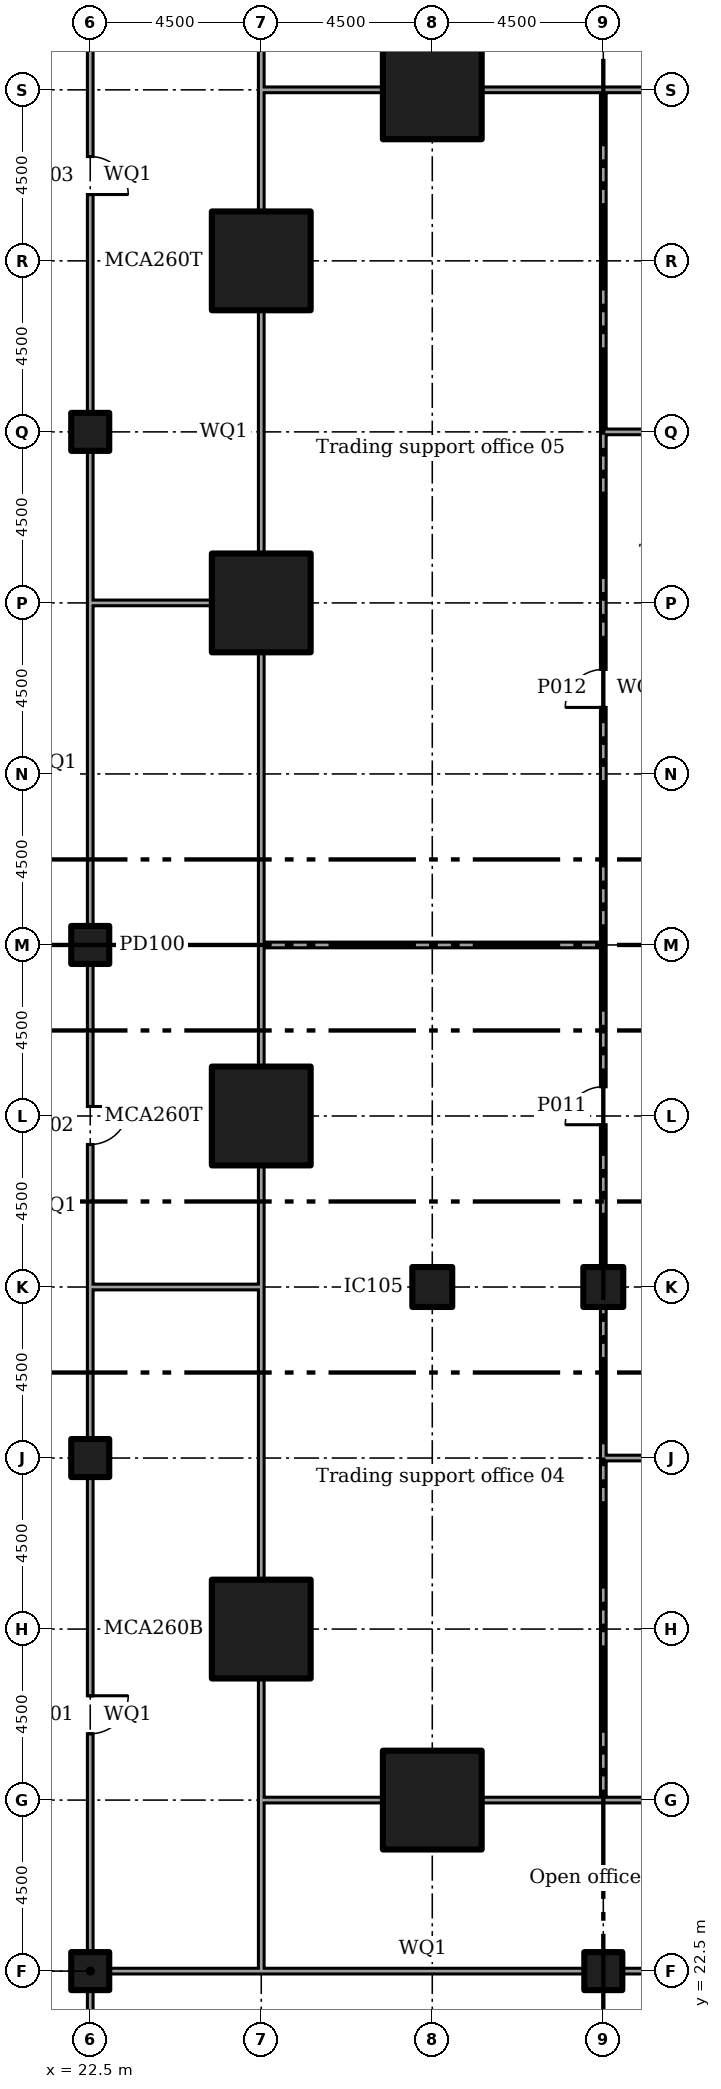
"""IFC4 building model, lengths in metres.
Left out: names, types, materials, properties, quantities, classifications, styles, units other than length and angle.
Written with IfcOpenShell. Run it as: python <this file> out.ifc"""

import sys

from ifc_helpers import new_model, si_unit, direction, frame, frame_2d, origin, origin_2d, place, context, subcontext, project, spatial, rectangle, extrude, element, fill, save


model = new_model("IFC4")
c1 = context("Model", 3, precision=1e-05, world=origin(), true_north=direction((0.0, 1.0)))
c2 = subcontext(c1, "Body", "Model", "MODEL_VIEW")
j1 = project(units=[si_unit("LENGTHUNIT", "METRE"), si_unit("PLANEANGLEUNIT", "RADIAN")], contexts=[c1])
p1 = place(None, origin())
s1 = spatial("IfcSite", under=j1, at=p1, CompositionType="ELEMENT")
p2 = place(p1, origin())
s2 = spatial("IfcBuilding", under=s1, at=p2, CompositionType="ELEMENT")
p3 = place(p2, frame((0.0, 0.0, 11.5)))
s3 = spatial("IfcBuildingStorey", under=s2, at=p3, CompositionType="ELEMENT", Elevation=11.5)
for number, where in (
    (1, (27.0, 31.5, 0.0)),
    (2, (27.0, 45.0, 0.0)),
    (3, (27.0, 58.5, 0.0)),
    (4, (27.0, 67.5, 0.0)),
    (5, (31.5, 27.0, 0.0)),
    (6, (31.5, 72.0, 0.0)),
):
    element("IfcColumn", number, at=place(p3, frame(where)), inside=s3, PredefinedType="COLUMN", context=c2, shape_type="SweptSolid", body=[
        extrude(rectangle(XDim=2.6, YDim=2.6, at=origin_2d()), origin(), (0.0, 0.0, 1.0), 5.0),
    ])
for number, where in (
    (7, (31.5, 40.5, 0.0)),
    (8, (36.0, 40.5, 0.0)),
):
    element("IfcColumn", number, at=place(p3, frame(where)), inside=s3, PredefinedType="COLUMN", context=c2, shape_type="SweptSolid", body=[
        extrude(rectangle(XDim=1.05, YDim=1.05, at=origin_2d()), origin(), (0.0, 0.0, 1.0), 5.0),
    ])
for number, where in (
    (9, (22.5, 22.5, 0.0)),
    (10, (22.5, 36.0, 0.0)),
    (11, (22.5, 49.5, 0.0)),
    (12, (22.5, 63.0, 0.0)),
    (13, (36.0, 22.5, 0.0)),
):
    element("IfcColumn", number, at=place(p3, frame(where)), inside=s3, PredefinedType="COLUMN", context=c2, shape_type="SweptSolid", body=[
        extrude(rectangle(XDim=1.0, YDim=1.0, at=origin_2d()), origin(), (0.0, 0.0, 1.0), 5.0),
    ])
p4 = place(p3, frame((22.5, 18.3, 0.0), z_axis=(0.0, 0.0, 1.0), x_axis=(0.0, 1.0, 0.0)))
e14 = element("IfcWall", 14, at=p4, inside=s3, PredefinedType="PARTITIONING", context=c2, shape_type="SweptSolid", body=[
    extrude(rectangle(XDim=3.705, YDim=0.15, at=frame_2d((1.853, 0.0))), origin(), (0.0, 0.0, 1.0), 4.55),
])
p5 = place(p4, frame((1.25, 0.0, 0.0)))
e15 = element("IfcOpeningElement", 15, at=p5, cuts=e14, PredefinedType="OPENING", context=c2, shape_type="SweptSolid", body=[
    extrude(rectangle(XDim=1.2, YDim=2.1, at=frame_2d((0.6, 1.05))), frame((0.0, 0.085, 0.0), z_axis=(0.0, -1.0, 0.0), x_axis=(1.0, 0.0, 0.0)), (0.0, 0.0, 1.0), 0.17),
])
p6 = place(p3, frame((22.5, 22.995, 0.0), z_axis=(0.0, 0.0, 1.0), x_axis=(0.0, 1.0, 0.0)))
e16 = element("IfcWall", 16, at=p6, inside=s3, PredefinedType="PARTITIONING", context=c2, shape_type="SweptSolid", body=[
    extrude(rectangle(XDim=12.51, YDim=0.15, at=frame_2d((6.255, 0.0))), origin(), (0.0, 0.0, 1.0), 4.55),
])
p7 = place(p6, frame((5.75, 0.0, 0.0)))
e17 = element("IfcOpeningElement", 17, at=p7, cuts=e16, PredefinedType="OPENING", context=c2, shape_type="SweptSolid", body=[
    extrude(rectangle(XDim=1.0, YDim=2.1, at=frame_2d((0.5, 1.05))), frame((0.0, 0.085, 0.0), z_axis=(0.0, -1.0, 0.0), x_axis=(1.0, 0.0, 0.0)), (0.0, 0.0, 1.0), 0.17),
])
p8 = place(p3, frame((22.5, 36.495, 0.0), z_axis=(0.0, 0.0, 1.0), x_axis=(0.0, 1.0, 0.0)))
e18 = element("IfcWall", 18, at=p8, inside=s3, PredefinedType="PARTITIONING", context=c2, shape_type="SweptSolid", body=[
    extrude(rectangle(XDim=4.08, YDim=0.15, at=frame_2d((2.04, 0.0))), origin(), (0.0, 0.0, 1.0), 4.55),
])
p9 = place(p3, frame((22.5, 40.5, 0.0), z_axis=(0.0, 0.0, 1.0), x_axis=(0.0, 1.0, 0.0)))
e19 = element("IfcWall", 19, at=p9, inside=s3, PredefinedType="PARTITIONING", context=c2, shape_type="SweptSolid", body=[
    extrude(rectangle(XDim=8.505, YDim=0.15, at=frame_2d((4.252, 0.0))), origin(), (0.0, 0.0, 1.0), 4.55),
])
p10 = place(p9, frame((3.75, 0.0, 0.0)))
e20 = element("IfcOpeningElement", 20, at=p10, cuts=e19, PredefinedType="OPENING", context=c2, shape_type="SweptSolid", body=[
    extrude(rectangle(XDim=1.0, YDim=2.1, at=frame_2d((0.5, 1.05))), frame((0.0, 0.085, 0.0), z_axis=(0.0, -1.0, 0.0), x_axis=(1.0, 0.0, 0.0)), (0.0, 0.0, 1.0), 0.17),
])
p11 = place(p3, frame((22.5, 49.995, 0.0), z_axis=(0.0, 0.0, 1.0), x_axis=(0.0, 1.0, 0.0)))
e21 = element("IfcWall", 21, at=p11, inside=s3, PredefinedType="PARTITIONING", context=c2, shape_type="SweptSolid", body=[
    extrude(rectangle(XDim=8.58, YDim=0.15, at=frame_2d((4.29, 0.0))), origin(), (0.0, 0.0, 1.0), 4.55),
])
p12 = place(p3, frame((22.5, 58.5, 0.0), z_axis=(0.0, 0.0, 1.0), x_axis=(0.0, 1.0, 0.0)))
e22 = element("IfcWall", 22, at=p12, inside=s3, PredefinedType="PARTITIONING", context=c2, shape_type="SweptSolid", body=[
    extrude(rectangle(XDim=4.005, YDim=0.15, at=frame_2d((2.002, 0.0))), origin(), (0.0, 0.0, 1.0), 4.55),
])
p13 = place(p3, frame((22.5, 63.495, 0.0), z_axis=(0.0, 0.0, 1.0), x_axis=(0.0, 1.0, 0.0)))
e23 = element("IfcWall", 23, at=p13, inside=s3, PredefinedType="PARTITIONING", context=c2, shape_type="SweptSolid", body=[
    extrude(rectangle(XDim=12.51, YDim=0.15, at=frame_2d((6.255, 0.0))), origin(), (0.0, 0.0, 1.0), 4.55),
])
p14 = place(p13, frame((5.75, 0.0, 0.0)))
e24 = element("IfcOpeningElement", 24, at=p14, cuts=e23, PredefinedType="OPENING", context=c2, shape_type="SweptSolid", body=[
    extrude(rectangle(XDim=1.0, YDim=2.1, at=frame_2d((0.5, 1.05))), frame((0.0, 0.085, 0.0), z_axis=(0.0, -1.0, 0.0), x_axis=(1.0, 0.0, 0.0)), (0.0, 0.0, 1.0), 0.17),
])
p15 = place(p3, frame((22.995, 22.5, 0.0)))
e25 = element("IfcWall", 25, at=p15, inside=s3, PredefinedType="PARTITIONING", context=c2, shape_type="SweptSolid", body=[
    extrude(rectangle(XDim=4.08, YDim=0.15, at=frame_2d((2.04, 0.0))), origin(), (0.0, 0.0, 1.0), 4.55),
])
p16 = place(p3, frame((27.0, 22.5, 0.0)))
e26 = element("IfcWall", 26, at=p16, inside=s3, PredefinedType="PARTITIONING", context=c2, shape_type="SweptSolid", body=[
    extrude(rectangle(XDim=8.505, YDim=0.15, at=frame_2d((4.252, 0.0))), origin(), (0.0, 0.0, 1.0), 4.55),
])
p17 = place(p3, frame((36.495, 22.5, 0.0)))
e27 = element("IfcWall", 27, at=p17, inside=s3, PredefinedType="PARTITIONING", context=c2, shape_type="SweptSolid", body=[
    extrude(rectangle(XDim=12.51, YDim=0.15, at=frame_2d((6.255, 0.0))), origin(), (0.0, 0.0, 1.0), 4.55),
])
p18 = place(p17, frame((5.75, 0.0, 0.0)))
e28 = element("IfcOpeningElement", 28, at=p18, cuts=e27, PredefinedType="OPENING", context=c2, shape_type="SweptSolid", body=[
    extrude(rectangle(XDim=1.0, YDim=2.1, at=frame_2d((0.5, 1.05))), frame((0.0, 0.085, 0.0), z_axis=(0.0, -1.0, 0.0), x_axis=(1.0, 0.0, 0.0)), (0.0, 0.0, 1.0), 0.17),
])
p19 = place(p3, frame((22.575, 40.5, 0.0)))
e29 = element("IfcWall", 29, at=p19, inside=s3, PredefinedType="PARTITIONING", context=c2, shape_type="SweptSolid", body=[
    extrude(rectangle(XDim=4.5, YDim=0.15, at=frame_2d((2.25, 0.0))), origin(), (0.0, 0.0, 1.0), 4.55),
])
p20 = place(p3, frame((27.0, 22.575, 0.0), z_axis=(0.0, 0.0, 1.0), x_axis=(0.0, 1.0, 0.0)))
e30 = element("IfcWall", 30, at=p20, inside=s3, PredefinedType="PARTITIONING", context=c2, shape_type="SweptSolid", body=[
    extrude(rectangle(XDim=4.5, YDim=0.15, at=frame_2d((2.25, 0.0))), origin(), (0.0, 0.0, 1.0), 4.55),
])
p21 = place(p3, frame((27.0, 27.0, 0.0), z_axis=(0.0, 0.0, 1.0), x_axis=(0.0, 1.0, 0.0)))
e31 = element("IfcWall", 31, at=p21, inside=s3, PredefinedType="PARTITIONING", context=c2, shape_type="SweptSolid", body=[
    extrude(rectangle(XDim=3.205, YDim=0.15, at=frame_2d((1.603, 0.0))), origin(), (0.0, 0.0, 1.0), 4.55),
])
p22 = place(p3, frame((27.0, 32.795, 0.0), z_axis=(0.0, 0.0, 1.0), x_axis=(0.0, 1.0, 0.0)))
e32 = element("IfcWall", 32, at=p22, inside=s3, PredefinedType="PARTITIONING", context=c2, shape_type="SweptSolid", body=[
    extrude(rectangle(XDim=7.63, YDim=0.15, at=frame_2d((3.815, 0.0))), origin(), (0.0, 0.0, 1.0), 4.55),
])
p23 = place(p3, frame((22.575, 58.5, 0.0)))
e33 = element("IfcWall", 33, at=p23, inside=s3, PredefinedType="PARTITIONING", context=c2, shape_type="SweptSolid", body=[
    extrude(rectangle(XDim=3.13, YDim=0.15, at=frame_2d((1.565, 0.0))), origin(), (0.0, 0.0, 1.0), 4.55),
])
p24 = place(p3, frame((27.0, 40.5, 0.0), z_axis=(0.0, 0.0, 1.0), x_axis=(0.0, 1.0, 0.0)))
e34 = element("IfcWall", 34, at=p24, inside=s3, PredefinedType="PARTITIONING", context=c2, shape_type="SweptSolid", body=[
    extrude(rectangle(XDim=3.205, YDim=0.15, at=frame_2d((1.603, 0.0))), origin(), (0.0, 0.0, 1.0), 4.55),
])
p25 = place(p3, frame((27.0, 46.295, 0.0), z_axis=(0.0, 0.0, 1.0), x_axis=(0.0, 1.0, 0.0)))
e35 = element("IfcWall", 35, at=p25, inside=s3, PredefinedType="PARTITIONING", context=c2, shape_type="SweptSolid", body=[
    extrude(rectangle(XDim=3.28, YDim=0.15, at=frame_2d((1.64, 0.0))), origin(), (0.0, 0.0, 1.0), 4.55),
])
p26 = place(p3, frame((27.0, 49.5, 0.0), z_axis=(0.0, 0.0, 1.0), x_axis=(0.0, 1.0, 0.0)))
e36 = element("IfcWall", 36, at=p26, inside=s3, PredefinedType="PARTITIONING", context=c2, shape_type="SweptSolid", body=[
    extrude(rectangle(XDim=7.705, YDim=0.15, at=frame_2d((3.853, 0.0))), origin(), (0.0, 0.0, 1.0), 4.55),
])
p27 = place(p3, frame((27.0, 71.925, 0.0), z_axis=(0.0, 0.0, 1.0), x_axis=(0.0, 1.0, 0.0)))
e37 = element("IfcWall", 37, at=p27, inside=s3, PredefinedType="PARTITIONING", context=c2, shape_type="SweptSolid", body=[
    extrude(rectangle(XDim=4.5, YDim=0.15, at=frame_2d((2.25, 0.0))), origin(), (0.0, 0.0, 1.0), 4.55),
])
p28 = place(p3, frame((27.0, 59.795, 0.0), z_axis=(0.0, 0.0, 1.0), x_axis=(0.0, 1.0, 0.0)))
e38 = element("IfcWall", 38, at=p28, inside=s3, PredefinedType="PARTITIONING", context=c2, shape_type="SweptSolid", body=[
    extrude(rectangle(XDim=6.41, YDim=0.15, at=frame_2d((3.205, 0.0))), origin(), (0.0, 0.0, 1.0), 4.55),
])
p29 = place(p3, frame((27.0, 68.795, 0.0), z_axis=(0.0, 0.0, 1.0), x_axis=(0.0, 1.0, 0.0)))
e39 = element("IfcWall", 39, at=p29, inside=s3, PredefinedType="PARTITIONING", context=c2, shape_type="SweptSolid", body=[
    extrude(rectangle(XDim=3.205, YDim=0.15, at=frame_2d((1.603, 0.0))), origin(), (0.0, 0.0, 1.0), 4.55),
])
p30 = place(p3, frame((35.925, 27.0, 0.0)))
e40 = element("IfcWall", 40, at=p30, inside=s3, PredefinedType="PARTITIONING", context=c2, shape_type="SweptSolid", body=[
    extrude(rectangle(XDim=7.78, YDim=0.15, at=frame_2d((3.89, 0.0))), origin(), (0.0, 0.0, 1.0), 4.55),
])
p31 = place(p3, frame((27.075, 27.0, 0.0)))
e41 = element("IfcWall", 41, at=p31, inside=s3, PredefinedType="PARTITIONING", context=c2, shape_type="SweptSolid", body=[
    extrude(rectangle(XDim=3.13, YDim=0.15, at=frame_2d((1.565, 0.0))), origin(), (0.0, 0.0, 1.0), 4.55),
])
p32 = place(p3, frame((32.795, 27.0, 0.0)))
e42 = element("IfcWall", 42, at=p32, inside=s3, PredefinedType="PARTITIONING", context=c2, shape_type="SweptSolid", body=[
    extrude(rectangle(XDim=3.205, YDim=0.15, at=frame_2d((1.603, 0.0))), origin(), (0.0, 0.0, 1.0), 4.55),
])
p33 = place(p3, frame((35.925, 72.0, 0.0)))
e43 = element("IfcWall", 43, at=p33, inside=s3, PredefinedType="PARTITIONING", context=c2, shape_type="SweptSolid", body=[
    extrude(rectangle(XDim=7.78, YDim=0.15, at=frame_2d((3.89, 0.0))), origin(), (0.0, 0.0, 1.0), 4.55),
])
p34 = place(p3, frame((27.075, 72.0, 0.0)))
e44 = element("IfcWall", 44, at=p34, inside=s3, PredefinedType="PARTITIONING", context=c2, shape_type="SweptSolid", body=[
    extrude(rectangle(XDim=3.13, YDim=0.15, at=frame_2d((1.565, 0.0))), origin(), (0.0, 0.0, 1.0), 4.55),
])
p35 = place(p3, frame((32.795, 72.0, 0.0)))
e45 = element("IfcWall", 45, at=p35, inside=s3, PredefinedType="PARTITIONING", context=c2, shape_type="SweptSolid", body=[
    extrude(rectangle(XDim=3.205, YDim=0.15, at=frame_2d((1.603, 0.0))), origin(), (0.0, 0.0, 1.0), 4.55),
])
p36 = place(p3, frame((36.0, 27.075, 0.0), z_axis=(0.0, 0.0, 1.0), x_axis=(0.0, 1.0, 0.0)))
e46 = element("IfcWall", 46, at=p36, inside=s3, PredefinedType="PARTITIONING", context=c2, shape_type="SweptSolid", body=[
    extrude(rectangle(XDim=9.0, YDim=0.15, at=frame_2d((4.5, 0.0))), origin(), (0.0, 0.0, 1.0), 4.55),
])
p37 = place(p3, frame((36.075, 36.0, 0.0)))
e47 = element("IfcWall", 47, at=p37, inside=s3, PredefinedType="PARTITIONING", context=c2, shape_type="SweptSolid", body=[
    extrude(rectangle(XDim=13.425, YDim=0.15, at=frame_2d((6.712, 0.0))), origin(), (0.0, 0.0, 1.0), 4.55),
])
p38 = place(p37, frame((6.175, 0.0, 0.0)))
e48 = element("IfcOpeningElement", 48, at=p38, cuts=e47, PredefinedType="OPENING", context=c2, shape_type="SweptSolid", body=[
    extrude(rectangle(XDim=1.0, YDim=2.1, at=frame_2d((0.5, 1.05))), frame((0.0, 0.085, 0.0), z_axis=(0.0, -1.0, 0.0), x_axis=(1.0, 0.0, 0.0)), (0.0, 0.0, 1.0), 0.17),
])
p39 = place(p3, frame((36.0, 62.925, 0.0), z_axis=(0.0, 0.0, 1.0), x_axis=(0.0, 1.0, 0.0)))
e49 = element("IfcWall", 49, at=p39, inside=s3, PredefinedType="PARTITIONING", context=c2, shape_type="SweptSolid", body=[
    extrude(rectangle(XDim=9.0, YDim=0.15, at=frame_2d((4.5, 0.0))), origin(), (0.0, 0.0, 1.0), 4.55),
])
p40 = place(p3, frame((36.075, 63.0, 0.0)))
e50 = element("IfcWall", 50, at=p40, inside=s3, PredefinedType="PARTITIONING", context=c2, shape_type="SweptSolid", body=[
    extrude(rectangle(XDim=3.905, YDim=0.15, at=frame_2d((1.953, 0.0))), origin(), (0.0, 0.0, 1.0), 4.55),
])
p41 = place(p3, frame((27.075, 49.5, 0.0)))
e51 = element("IfcWall", 51, at=p41, inside=s3, PredefinedType="PARTITIONING", context=c2, shape_type="SweptSolid", body=[
    extrude(rectangle(XDim=9.0, YDim=0.15, at=frame_2d((4.5, 0.0))), origin(), (0.0, 0.0, 1.0), 4.55),
])
p42 = place(p3, frame((36.0, 36.0, 0.0), z_axis=(0.0, 0.0, 1.0), x_axis=(0.0, 1.0, 0.0)))
e52 = element("IfcWall", 52, at=p42, inside=s3, PredefinedType="PARTITIONING", context=c2, shape_type="SweptSolid", body=[
    extrude(rectangle(XDim=3.98, YDim=0.15, at=frame_2d((1.99, 0.0))), origin(), (0.0, 0.0, 1.0), 4.55),
])
p43 = place(p3, frame((36.0, 41.02, 0.0), z_axis=(0.0, 0.0, 1.0), x_axis=(0.0, 1.0, 0.0)))
e53 = element("IfcWall", 53, at=p43, inside=s3, PredefinedType="PARTITIONING", context=c2, shape_type="SweptSolid", body=[
    extrude(rectangle(XDim=8.405, YDim=0.15, at=frame_2d((4.203, 0.0))), origin(), (0.0, 0.0, 1.0), 4.55),
])
p44 = place(p43, frame((3.75, 0.0, 0.0)))
e54 = element("IfcOpeningElement", 54, at=p44, cuts=e53, PredefinedType="OPENING", context=c2, shape_type="SweptSolid", body=[
    extrude(rectangle(XDim=1.0, YDim=2.1, at=frame_2d((0.5, 1.05))), frame((0.0, 0.085, 0.0), z_axis=(0.0, -1.0, 0.0), x_axis=(1.0, 0.0, 0.0)), (0.0, 0.0, 1.0), 0.17),
])
p45 = place(p3, frame((36.0, 49.5, 0.0), z_axis=(0.0, 0.0, 1.0), x_axis=(0.0, 1.0, 0.0)))
e55 = element("IfcWall", 55, at=p45, inside=s3, PredefinedType="PARTITIONING", context=c2, shape_type="SweptSolid", body=[
    extrude(rectangle(XDim=13.5, YDim=0.15, at=frame_2d((6.75, 0.0))), origin(), (0.0, 0.0, 1.0), 4.55),
])
p46 = place(p45, frame((6.25, 0.0, 0.0)))
e56 = element("IfcOpeningElement", 56, at=p46, cuts=e55, PredefinedType="OPENING", context=c2, shape_type="SweptSolid", body=[
    extrude(rectangle(XDim=1.0, YDim=2.1, at=frame_2d((0.5, 1.05))), frame((0.0, 0.085, 0.0), z_axis=(0.0, -1.0, 0.0), x_axis=(1.0, 0.0, 0.0)), (0.0, 0.0, 1.0), 0.17),
])
p47 = place(p7, frame((1.0, 0.0, 0.0), x_axis=(-1.0, 0.0, 0.0)))
e57 = element("IfcDoor", 57, at=p47, inside=s3, OperationType="SINGLE_SWING_RIGHT", PredefinedType="DOOR", context=c2, shape_type="SweptSolid", body=[
    extrude(rectangle(XDim=1.0, YDim=2.1, at=frame_2d((0.5, 1.05))), frame((0.0, 0.025, 0.0), z_axis=(0.0, -1.0, 0.0), x_axis=(1.0, 0.0, 0.0)), (0.0, 0.0, 1.0), 0.05),
])
fill(e17, e57)
p48 = place(p10, frame((1.0, 0.0, 0.0), x_axis=(-1.0, 0.0, 0.0)))
e58 = element("IfcDoor", 58, at=p48, inside=s3, OperationType="SINGLE_SWING_RIGHT", PredefinedType="DOOR", context=c2, shape_type="SweptSolid", body=[
    extrude(rectangle(XDim=1.0, YDim=2.1, at=frame_2d((0.5, 1.05))), frame((0.0, 0.025, 0.0), z_axis=(0.0, -1.0, 0.0), x_axis=(1.0, 0.0, 0.0)), (0.0, 0.0, 1.0), 0.05),
])
fill(e20, e58)
p49 = place(p14, frame((1.0, 0.0, 0.0), x_axis=(-1.0, 0.0, 0.0)))
e59 = element("IfcDoor", 59, at=p49, inside=s3, OperationType="SINGLE_SWING_LEFT", PredefinedType="DOOR", context=c2, shape_type="SweptSolid", body=[
    extrude(rectangle(XDim=1.0, YDim=2.1, at=frame_2d((0.5, 1.05))), frame((0.0, 0.025, 0.0), z_axis=(0.0, -1.0, 0.0), x_axis=(1.0, 0.0, 0.0)), (0.0, 0.0, 1.0), 0.05),
])
fill(e24, e59)
p50 = place(p44, origin())
e60 = element("IfcDoor", 60, at=p50, inside=s3, OperationType="SINGLE_SWING_RIGHT", PredefinedType="DOOR", context=c2, shape_type="SweptSolid", body=[
    extrude(rectangle(XDim=1.0, YDim=2.1, at=frame_2d((0.5, 1.05))), frame((0.0, 0.025, 0.0), z_axis=(0.0, -1.0, 0.0), x_axis=(1.0, 0.0, 0.0)), (0.0, 0.0, 1.0), 0.05),
])
fill(e54, e60)
p51 = place(p46, origin())
e61 = element("IfcDoor", 61, at=p51, inside=s3, OperationType="SINGLE_SWING_RIGHT", PredefinedType="DOOR", context=c2, shape_type="SweptSolid", body=[
    extrude(rectangle(XDim=1.0, YDim=2.1, at=frame_2d((0.5, 1.05))), frame((0.0, 0.025, 0.0), z_axis=(0.0, -1.0, 0.0), x_axis=(1.0, 0.0, 0.0)), (0.0, 0.0, 1.0), 0.05),
])
fill(e56, e61)
save(model, sys.argv[1])
